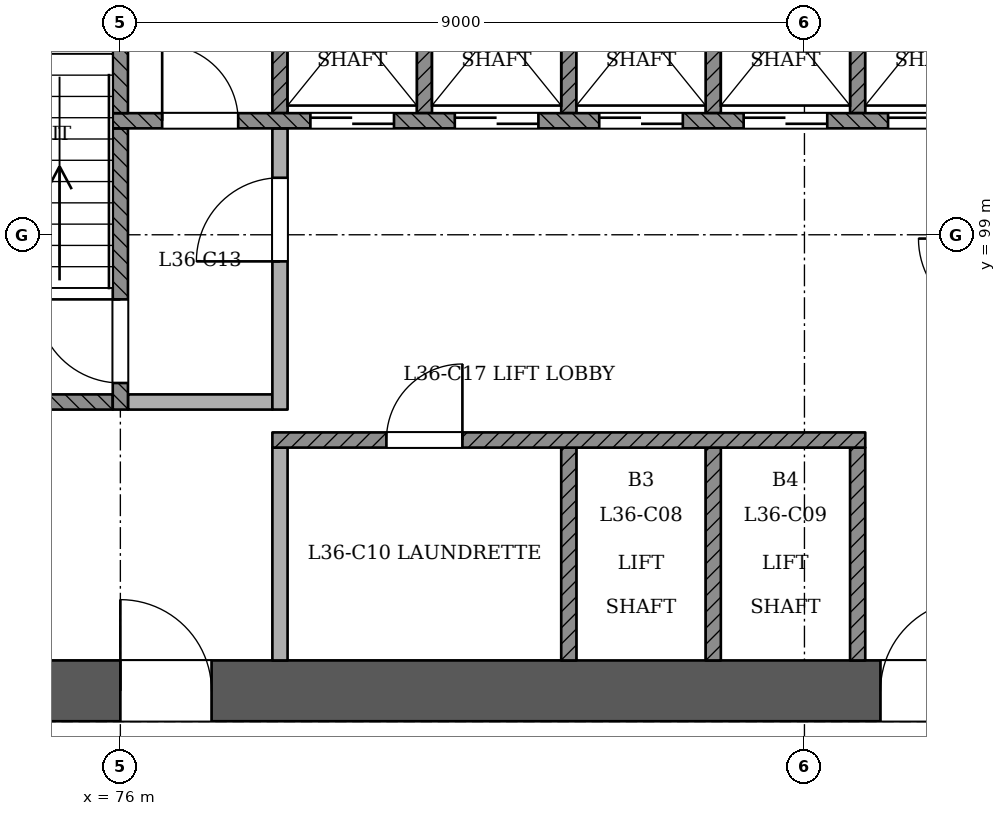
"""IFC4 building model, lengths in metres.
Left out: names, types, materials, properties, quantities, classifications, styles, units other than length and angle.
Written with IfcOpenShell. Run it as: python <this file> out.ifc"""

import sys

from ifc_helpers import new_model, si_unit, direction, frame, frame_2d, origin, place, context, subcontext, project, spatial, rectangle, extrude, element, fill, save


model = new_model("IFC4")
c1 = context("Model", 3, precision=1e-05, world=origin(), true_north=direction((0.0, 1.0)))
c2 = subcontext(c1, "Body", "Model", "MODEL_VIEW")
j1 = project(units=[si_unit("LENGTHUNIT", "METRE"), si_unit("PLANEANGLEUNIT", "RADIAN")], contexts=[c1])
p1 = place(None, origin())
s1 = spatial("IfcSite", under=j1, at=p1, CompositionType="ELEMENT")
p2 = place(p1, origin())
s2 = spatial("IfcBuilding", under=s1, at=p2, CompositionType="ELEMENT")
p3 = place(p2, frame((0.0, 0.0, 142.2)))
s3 = spatial("IfcBuildingStorey", under=s2, at=p3, CompositionType="ELEMENT", Elevation=142.2)
p4 = place(p3, frame((72.6, 93.0, 0.0), z_axis=(0.0, 0.0, 1.0), x_axis=(1.0, 0.0, 0.0)))
e1 = element("IfcWall", 1, at=p4, inside=s3, PredefinedType="SHEAR", context=c2, shape_type="SweptSolid", body=[
    extrude(rectangle(XDim=25.2, YDim=0.8, at=frame_2d((12.6, 0.0))), origin(), (0.0, 0.0, 1.0), 3.6),
])
p5 = place(p4, frame((1.2, 0.0, 0.0)))
e2 = element("IfcOpeningElement", 2, at=p5, cuts=e1, PredefinedType="OPENING", context=c2, shape_type="SweptSolid", body=[
    extrude(rectangle(XDim=1.2, YDim=2.1, at=frame_2d((0.6, 1.05))), frame((0.0, 0.411, 0.0), z_axis=(0.0, -1.0, 0.0), x_axis=(1.0, 0.0, 0.0)), (0.0, 0.0, 1.0), 0.821),
])
p6 = place(p4, frame((3.4, 0.0, 0.0)))
e3 = element("IfcOpeningElement", 3, at=p6, cuts=e1, PredefinedType="OPENING", context=c2, shape_type="SweptSolid", body=[
    extrude(rectangle(XDim=1.2, YDim=2.1, at=frame_2d((0.6, 1.05))), frame((0.0, 0.411, 0.0), z_axis=(0.0, -1.0, 0.0), x_axis=(1.0, 0.0, 0.0)), (0.0, 0.0, 1.0), 0.821),
])
p7 = place(p4, frame((13.4, 0.0, 0.0)))
e4 = element("IfcOpeningElement", 4, at=p7, cuts=e1, PredefinedType="OPENING", context=c2, shape_type="SweptSolid", body=[
    extrude(rectangle(XDim=1.2, YDim=2.1, at=frame_2d((0.6, 1.05))), frame((0.0, 0.411, 0.0), z_axis=(0.0, -1.0, 0.0), x_axis=(1.0, 0.0, 0.0)), (0.0, 0.0, 1.0), 0.821),
])
p8 = place(p4, frame((15.462, 0.0, 0.0)))
e5 = element("IfcOpeningElement", 5, at=p8, cuts=e1, PredefinedType="OPENING", context=c2, shape_type="SweptSolid", body=[
    extrude(rectangle(XDim=1.0, YDim=2.1, at=frame_2d((0.5, 1.05))), frame((0.0, 0.411, 0.0), z_axis=(0.0, -1.0, 0.0), x_axis=(1.0, 0.0, 0.0)), (0.0, 0.0, 1.0), 0.821),
])
p9 = place(p4, frame((17.7, 0.0, 0.0)))
e6 = element("IfcOpeningElement", 6, at=p9, cuts=e1, PredefinedType="OPENING", context=c2, shape_type="SweptSolid", body=[
    extrude(rectangle(XDim=1.0, YDim=2.1, at=frame_2d((0.5, 1.05))), frame((0.0, 0.411, 0.0), z_axis=(0.0, -1.0, 0.0), x_axis=(1.0, 0.0, 0.0)), (0.0, 0.0, 1.0), 0.821),
])
p10 = place(p4, frame((20.25, 0.0, 0.0)))
e7 = element("IfcOpeningElement", 7, at=p10, cuts=e1, PredefinedType="OPENING", context=c2, shape_type="SweptSolid", body=[
    extrude(rectangle(XDim=1.0, YDim=2.1, at=frame_2d((0.5, 1.05))), frame((0.0, 0.411, 0.0), z_axis=(0.0, -1.0, 0.0), x_axis=(1.0, 0.0, 0.0)), (0.0, 0.0, 1.0), 0.821),
])
p11 = place(p4, frame((22.738, 0.0, 0.0)))
e8 = element("IfcOpeningElement", 8, at=p11, cuts=e1, PredefinedType="OPENING", context=c2, shape_type="SweptSolid", body=[
    extrude(rectangle(XDim=1.0, YDim=2.1, at=frame_2d((0.5, 1.05))), frame((0.0, 0.411, 0.0), z_axis=(0.0, -1.0, 0.0), x_axis=(1.0, 0.0, 0.0)), (0.0, 0.0, 1.0), 0.821),
])
p12 = place(p3, frame((64.449, 99.517, 0.0), z_axis=(0.0, 0.0, 1.0), x_axis=(0.499425839766, -0.866356641675, 0.0)))
e9 = element("IfcWall", 9, at=p12, inside=s3, PredefinedType="PARTITIONING", context=c2, shape_type="SweptSolid", body=[
    extrude(rectangle(XDim=41.118, YDim=0.15, at=frame_2d((20.559, 0.0))), origin(), (0.0, 0.0, 1.0), 2.75),
])
p13 = place(p12, frame((0.951, 0.0, 0.0)))
e10 = element("IfcOpeningElement", 10, at=p13, cuts=e9, PredefinedType="OPENING", context=c2, shape_type="SweptSolid", body=[
    extrude(rectangle(XDim=1.2, YDim=2.1, at=frame_2d((0.6, 1.05))), frame((0.0, 0.085, 0.0), z_axis=(0.0, -1.0, 0.0), x_axis=(1.0, 0.0, 0.0)), (0.0, 0.0, 1.0), 0.171),
])
p14 = place(p12, frame((10.552, 0.0, 0.0)))
e11 = element("IfcOpeningElement", 11, at=p14, cuts=e9, PredefinedType="OPENING", context=c2, shape_type="SweptSolid", body=[
    extrude(rectangle(XDim=1.0, YDim=2.1, at=frame_2d((0.5, 1.05))), frame((0.0, 0.085, 0.0), z_axis=(0.0, -1.0, 0.0), x_axis=(1.0, 0.0, 0.0)), (0.0, 0.0, 1.0), 0.171),
])
p15 = place(p12, frame((12.762, 0.0, 0.0)))
e12 = element("IfcOpeningElement", 12, at=p15, cuts=e9, PredefinedType="OPENING", context=c2, shape_type="SweptSolid", body=[
    extrude(rectangle(XDim=1.0, YDim=2.1, at=frame_2d((0.5, 1.05))), frame((0.0, 0.085, 0.0), z_axis=(0.0, -1.0, 0.0), x_axis=(1.0, 0.0, 0.0)), (0.0, 0.0, 1.0), 0.171),
])
p16 = place(p12, frame((20.557, 0.0, 0.0)))
e13 = element("IfcOpeningElement", 13, at=p16, cuts=e9, PredefinedType="OPENING", context=c2, shape_type="SweptSolid", body=[
    extrude(rectangle(XDim=1.2, YDim=2.1, at=frame_2d((0.6, 1.05))), frame((0.0, 0.085, 0.0), z_axis=(0.0, -1.0, 0.0), x_axis=(1.0, 0.0, 0.0)), (0.0, 0.0, 1.0), 0.171),
])
p17 = place(p12, frame((28.436, 0.0, 0.0)))
e14 = element("IfcOpeningElement", 14, at=p17, cuts=e9, PredefinedType="OPENING", context=c2, shape_type="SweptSolid", body=[
    extrude(rectangle(XDim=1.0, YDim=2.1, at=frame_2d((0.5, 1.05))), frame((0.0, 0.085, 0.0), z_axis=(0.0, -1.0, 0.0), x_axis=(1.0, 0.0, 0.0)), (0.0, 0.0, 1.0), 0.171),
])
p18 = place(p12, frame((32.957, 0.0, 0.0)))
e15 = element("IfcOpeningElement", 15, at=p18, cuts=e9, PredefinedType="OPENING", context=c2, shape_type="SweptSolid", body=[
    extrude(rectangle(XDim=1.2, YDim=2.1, at=frame_2d((0.6, 1.05))), frame((0.0, 0.085, 0.0), z_axis=(0.0, -1.0, 0.0), x_axis=(1.0, 0.0, 0.0)), (0.0, 0.0, 1.0), 0.171),
])
p19 = place(p12, frame((39.53, 0.0, 0.0)))
e16 = element("IfcOpeningElement", 16, at=p19, cuts=e9, PredefinedType="OPENING", context=c2, shape_type="SweptSolid", body=[
    extrude(rectangle(XDim=1.0, YDim=2.1, at=frame_2d((0.5, 1.05))), frame((0.0, 0.085, 0.0), z_axis=(0.0, -1.0, 0.0), x_axis=(1.0, 0.0, 0.0)), (0.0, 0.0, 1.0), 0.171),
])
p20 = place(p3, frame((85.065, 63.98, 0.0), z_axis=(0.0, 0.0, 1.0), x_axis=(0.499427357949, 0.866355766491, 0.0)))
e17 = element("IfcWall", 17, at=p20, inside=s3, PredefinedType="PARTITIONING", context=c2, shape_type="SweptSolid", body=[
    extrude(rectangle(XDim=41.02, YDim=0.15, at=frame_2d((20.51, 0.0))), origin(), (0.0, 0.0, 1.0), 2.75),
])
p21 = place(p20, frame((0.382, 0.0, 0.0)))
e18 = element("IfcOpeningElement", 18, at=p21, cuts=e17, PredefinedType="OPENING", context=c2, shape_type="SweptSolid", body=[
    extrude(rectangle(XDim=1.2, YDim=2.1, at=frame_2d((0.6, 1.05))), frame((0.0, 0.085, 0.0), z_axis=(0.0, -1.0, 0.0), x_axis=(1.0, 0.0, 0.0)), (0.0, 0.0, 1.0), 0.171),
])
p22 = place(p20, frame((2.583, 0.0, 0.0)))
e19 = element("IfcOpeningElement", 19, at=p22, cuts=e17, PredefinedType="OPENING", context=c2, shape_type="SweptSolid", body=[
    extrude(rectangle(XDim=1.0, YDim=2.1, at=frame_2d((0.5, 1.05))), frame((0.0, 0.085, 0.0), z_axis=(0.0, -1.0, 0.0), x_axis=(1.0, 0.0, 0.0)), (0.0, 0.0, 1.0), 0.171),
])
p23 = place(p20, frame((8.113, 0.0, 0.0)))
e20 = element("IfcOpeningElement", 20, at=p23, cuts=e17, PredefinedType="OPENING", context=c2, shape_type="SweptSolid", body=[
    extrude(rectangle(XDim=1.0, YDim=2.1, at=frame_2d((0.5, 1.05))), frame((0.0, 0.085, 0.0), z_axis=(0.0, -1.0, 0.0), x_axis=(1.0, 0.0, 0.0)), (0.0, 0.0, 1.0), 0.171),
])
p24 = place(p20, frame((11.467, 0.0, 0.0)))
e21 = element("IfcOpeningElement", 21, at=p24, cuts=e17, PredefinedType="OPENING", context=c2, shape_type="SweptSolid", body=[
    extrude(rectangle(XDim=1.0, YDim=2.1, at=frame_2d((0.5, 1.05))), frame((0.0, 0.085, 0.0), z_axis=(0.0, -1.0, 0.0), x_axis=(1.0, 0.0, 0.0)), (0.0, 0.0, 1.0), 0.171),
])
p25 = place(p20, frame((18.142, 0.0, 0.0)))
e22 = element("IfcOpeningElement", 22, at=p25, cuts=e17, PredefinedType="OPENING", context=c2, shape_type="SweptSolid", body=[
    extrude(rectangle(XDim=1.0, YDim=2.1, at=frame_2d((0.5, 1.05))), frame((0.0, 0.085, 0.0), z_axis=(0.0, -1.0, 0.0), x_axis=(1.0, 0.0, 0.0)), (0.0, 0.0, 1.0), 0.171),
])
p26 = place(p20, frame((20.583, 0.0, 0.0)))
e23 = element("IfcOpeningElement", 23, at=p26, cuts=e17, PredefinedType="OPENING", context=c2, shape_type="SweptSolid", body=[
    extrude(rectangle(XDim=1.0, YDim=2.1, at=frame_2d((0.5, 1.05))), frame((0.0, 0.085, 0.0), z_axis=(0.0, -1.0, 0.0), x_axis=(1.0, 0.0, 0.0)), (0.0, 0.0, 1.0), 0.171),
])
p27 = place(p20, frame((26.113, 0.0, 0.0)))
e24 = element("IfcOpeningElement", 24, at=p27, cuts=e17, PredefinedType="OPENING", context=c2, shape_type="SweptSolid", body=[
    extrude(rectangle(XDim=1.0, YDim=2.1, at=frame_2d((0.5, 1.05))), frame((0.0, 0.085, 0.0), z_axis=(0.0, -1.0, 0.0), x_axis=(1.0, 0.0, 0.0)), (0.0, 0.0, 1.0), 0.171),
])
p28 = place(p20, frame((33.863, 0.0, 0.0)))
e25 = element("IfcOpeningElement", 25, at=p28, cuts=e17, PredefinedType="OPENING", context=c2, shape_type="SweptSolid", body=[
    extrude(rectangle(XDim=1.2, YDim=2.1, at=frame_2d((0.6, 1.05))), frame((0.0, 0.085, 0.0), z_axis=(0.0, -1.0, 0.0), x_axis=(1.0, 0.0, 0.0)), (0.0, 0.0, 1.0), 0.171),
])
p29 = place(p20, frame((39.545, 0.0, 0.0)))
e26 = element("IfcOpeningElement", 26, at=p29, cuts=e17, PredefinedType="OPENING", context=c2, shape_type="SweptSolid", body=[
    extrude(rectangle(XDim=1.2, YDim=2.1, at=frame_2d((0.6, 1.05))), frame((0.0, 0.085, 0.0), z_axis=(0.0, -1.0, 0.0), x_axis=(1.0, 0.0, 0.0)), (0.0, 0.0, 1.0), 0.171),
])
p30 = place(p3, frame((78.1, 93.4, 0.0), z_axis=(0.0, 0.0, 1.0), x_axis=(0.0, 1.0, 0.0)))
e27 = element("IfcWall", 27, at=p30, inside=s3, PredefinedType="PARTITIONING", context=c2, shape_type="SweptSolid", body=[
    extrude(rectangle(XDim=2.8, YDim=0.2, at=frame_2d((1.4, 0.0))), origin(), (0.0, 0.0, 1.0), 3.15),
])
for number, where, z_axis, x_axis in (
    (28, (81.9, 93.4, 0.0), (0.0, 0.0, 1.0), (0.0, 1.0, 0.0)),
    (29, (83.8, 93.4, 0.0), (0.0, 0.0, 1.0), (0.0, 1.0, 0.0)),
    (30, (85.7, 93.4, 0.0), (0.0, 0.0, 1.0), (0.0, 1.0, 0.0)),
):
    element("IfcWall", number, at=place(p3, frame(where, z_axis=z_axis, x_axis=x_axis)), inside=s3, PredefinedType="SOLIDWALL", context=c2, shape_type="SweptSolid", body=[
        extrude(rectangle(XDim=2.8, YDim=0.2, at=frame_2d((1.4, 0.0))), origin(), (0.0, 0.0, 1.0), 3.15),
    ])
p31 = place(p3, frame((78.0, 96.3, 0.0), z_axis=(0.0, 0.0, 1.0), x_axis=(1.0, 0.0, 0.0)))
e31 = element("IfcWall", 31, at=p31, inside=s3, PredefinedType="SOLIDWALL", context=c2, shape_type="SweptSolid", body=[
    extrude(rectangle(XDim=7.8, YDim=0.2, at=frame_2d((3.9, 0.0))), origin(), (0.0, 0.0, 1.0), 3.15),
])
p32 = place(p31, frame((1.5, 0.0, 0.0)))
e32 = element("IfcOpeningElement", 32, at=p32, cuts=e31, PredefinedType="OPENING", context=c2, shape_type="SweptSolid", body=[
    extrude(rectangle(XDim=1.0, YDim=2.1, at=frame_2d((0.5, 1.05))), frame((0.0, 0.11, 0.0), z_axis=(0.0, -1.0, 0.0), x_axis=(1.0, 0.0, 0.0)), (0.0, 0.0, 1.0), 0.221),
])
p33 = place(p3, frame((73.0, 96.8, 0.0), z_axis=(0.0, 0.0, 1.0), x_axis=(1.0, 0.0, 0.0)))
e33 = element("IfcWall", 33, at=p33, inside=s3, PredefinedType="SOLIDWALL", context=c2, shape_type="SweptSolid", body=[
    extrude(rectangle(XDim=2.9, YDim=0.2, at=frame_2d((1.45, 0.0))), origin(), (0.0, 0.0, 1.0), 3.15),
])
p34 = place(p3, frame((76.0, 96.7, 0.0), z_axis=(0.0, 0.0, 1.0), x_axis=(0.0, 1.0, 0.0)))
e34 = element("IfcWall", 34, at=p34, inside=s3, PredefinedType="SOLIDWALL", context=c2, shape_type="SweptSolid", body=[
    extrude(rectangle(XDim=3.7, YDim=0.2, at=frame_2d((1.85, 0.0))), origin(), (0.0, 0.0, 1.0), 3.15),
])
p35 = place(p34, frame((0.35, 0.0, 0.0)))
e35 = element("IfcOpeningElement", 35, at=p35, cuts=e34, PredefinedType="OPENING", context=c2, shape_type="SweptSolid", body=[
    extrude(rectangle(XDim=1.1, YDim=2.1, at=frame_2d((0.55, 1.05))), frame((0.0, 0.11, 0.0), z_axis=(0.0, -1.0, 0.0), x_axis=(1.0, 0.0, 0.0)), (0.0, 0.0, 1.0), 0.221),
])
p36 = place(p3, frame((76.1, 96.8, 0.0), z_axis=(0.0, 0.0, 1.0), x_axis=(1.0, 0.0, 0.0)))
e36 = element("IfcWall", 36, at=p36, inside=s3, PredefinedType="PARTITIONING", context=c2, shape_type="SweptSolid", body=[
    extrude(rectangle(XDim=1.9, YDim=0.2, at=frame_2d((0.95, 0.0))), origin(), (0.0, 0.0, 1.0), 3.15),
])
p37 = place(p3, frame((78.1, 96.7, 0.0), z_axis=(0.0, 0.0, 1.0), x_axis=(0.0, 1.0, 0.0)))
e37 = element("IfcWall", 37, at=p37, inside=s3, PredefinedType="PARTITIONING", context=c2, shape_type="SweptSolid", body=[
    extrude(rectangle(XDim=3.7, YDim=0.2, at=frame_2d((1.85, 0.0))), origin(), (0.0, 0.0, 1.0), 3.15),
])
p38 = place(p37, frame((1.95, 0.0, 0.0)))
e38 = element("IfcOpeningElement", 38, at=p38, cuts=e37, PredefinedType="OPENING", context=c2, shape_type="SweptSolid", body=[
    extrude(rectangle(XDim=1.1, YDim=2.1, at=frame_2d((0.55, 1.05))), frame((0.0, 0.11, 0.0), z_axis=(0.0, -1.0, 0.0), x_axis=(1.0, 0.0, 0.0)), (0.0, 0.0, 1.0), 0.221),
])
p39 = place(p3, frame((75.9, 100.5, 0.0), z_axis=(0.0, 0.0, 1.0), x_axis=(1.0, 0.0, 0.0)))
e39 = element("IfcWall", 39, at=p39, inside=s3, PredefinedType="SOLIDWALL", context=c2, shape_type="SweptSolid", body=[
    extrude(rectangle(XDim=18.2, YDim=0.2, at=frame_2d((9.1, 0.0))), origin(), (0.0, 0.0, 1.0), 3.15),
])
p40 = place(p39, frame((2.6, 0.0, 0.0)))
e40 = element("IfcOpeningElement", 40, at=p40, cuts=e39, PredefinedType="OPENING", context=c2, shape_type="SweptSolid", body=[
    extrude(rectangle(XDim=1.1, YDim=2.1, at=frame_2d((0.55, 1.05))), frame((0.0, 0.11, 0.0), z_axis=(0.0, -1.0, 0.0), x_axis=(1.0, 0.0, 0.0)), (0.0, 0.0, 1.0), 0.221),
])
p41 = place(p39, frame((4.5, 0.0, 0.0)))
e41 = element("IfcOpeningElement", 41, at=p41, cuts=e39, PredefinedType="OPENING", context=c2, shape_type="SweptSolid", body=[
    extrude(rectangle(XDim=1.1, YDim=2.1, at=frame_2d((0.55, 1.05))), frame((0.0, 0.11, 0.0), z_axis=(0.0, -1.0, 0.0), x_axis=(1.0, 0.0, 0.0)), (0.0, 0.0, 1.0), 0.221),
])
p42 = place(p39, frame((6.4, 0.0, 0.0)))
e42 = element("IfcOpeningElement", 42, at=p42, cuts=e39, PredefinedType="OPENING", context=c2, shape_type="SweptSolid", body=[
    extrude(rectangle(XDim=1.1, YDim=2.1, at=frame_2d((0.55, 1.05))), frame((0.0, 0.11, 0.0), z_axis=(0.0, -1.0, 0.0), x_axis=(1.0, 0.0, 0.0)), (0.0, 0.0, 1.0), 0.221),
])
p43 = place(p39, frame((8.3, 0.0, 0.0)))
e43 = element("IfcOpeningElement", 43, at=p43, cuts=e39, PredefinedType="OPENING", context=c2, shape_type="SweptSolid", body=[
    extrude(rectangle(XDim=1.1, YDim=2.1, at=frame_2d((0.55, 1.05))), frame((0.0, 0.11, 0.0), z_axis=(0.0, -1.0, 0.0), x_axis=(1.0, 0.0, 0.0)), (0.0, 0.0, 1.0), 0.221),
])
p44 = place(p39, frame((10.2, 0.0, 0.0)))
e44 = element("IfcOpeningElement", 44, at=p44, cuts=e39, PredefinedType="OPENING", context=c2, shape_type="SweptSolid", body=[
    extrude(rectangle(XDim=1.1, YDim=2.1, at=frame_2d((0.55, 1.05))), frame((0.0, 0.11, 0.0), z_axis=(0.0, -1.0, 0.0), x_axis=(1.0, 0.0, 0.0)), (0.0, 0.0, 1.0), 0.221),
])
p45 = place(p39, frame((12.1, 0.0, 0.0)))
e45 = element("IfcOpeningElement", 45, at=p45, cuts=e39, PredefinedType="OPENING", context=c2, shape_type="SweptSolid", body=[
    extrude(rectangle(XDim=1.1, YDim=2.1, at=frame_2d((0.55, 1.05))), frame((0.0, 0.11, 0.0), z_axis=(0.0, -1.0, 0.0), x_axis=(1.0, 0.0, 0.0)), (0.0, 0.0, 1.0), 0.221),
])
p46 = place(p39, frame((14.0, 0.0, 0.0)))
e46 = element("IfcOpeningElement", 46, at=p46, cuts=e39, PredefinedType="OPENING", context=c2, shape_type="SweptSolid", body=[
    extrude(rectangle(XDim=1.1, YDim=2.1, at=frame_2d((0.55, 1.05))), frame((0.0, 0.11, 0.0), z_axis=(0.0, -1.0, 0.0), x_axis=(1.0, 0.0, 0.0)), (0.0, 0.0, 1.0), 0.221),
])
p47 = place(p39, frame((0.65, 0.0, 0.0)))
e47 = element("IfcOpeningElement", 47, at=p47, cuts=e39, PredefinedType="OPENING", context=c2, shape_type="SweptSolid", body=[
    extrude(rectangle(XDim=1.0, YDim=2.1, at=frame_2d((0.5, 1.05))), frame((0.0, 0.11, 0.0), z_axis=(0.0, -1.0, 0.0), x_axis=(1.0, 0.0, 0.0)), (0.0, 0.0, 1.0), 0.221),
])
p48 = place(p39, frame((16.3, 0.0, 0.0)))
e48 = element("IfcOpeningElement", 48, at=p48, cuts=e39, PredefinedType="OPENING", context=c2, shape_type="SweptSolid", body=[
    extrude(rectangle(XDim=1.0, YDim=2.1, at=frame_2d((0.5, 1.05))), frame((0.0, 0.11, 0.0), z_axis=(0.0, -1.0, 0.0), x_axis=(1.0, 0.0, 0.0)), (0.0, 0.0, 1.0), 0.221),
])
for number, where, z_axis, x_axis in (
    (49, (76.0, 100.6, 0.0), (0.0, 0.0, 1.0), (0.0, 1.0, 0.0)),
    (50, (78.1, 100.6, 0.0), (0.0, 0.0, 1.0), (0.0, 1.0, 0.0)),
    (51, (80.0, 100.6, 0.0), (0.0, 0.0, 1.0), (0.0, 1.0, 0.0)),
    (52, (81.9, 100.6, 0.0), (0.0, 0.0, 1.0), (0.0, 1.0, 0.0)),
    (53, (83.8, 100.6, 0.0), (0.0, 0.0, 1.0), (0.0, 1.0, 0.0)),
    (54, (85.7, 100.6, 0.0), (0.0, 0.0, 1.0), (0.0, 1.0, 0.0)),
):
    element("IfcWall", number, at=place(p3, frame(where, z_axis=z_axis, x_axis=x_axis)), inside=s3, PredefinedType="SOLIDWALL", context=c2, shape_type="SweptSolid", body=[
        extrude(rectangle(XDim=2.8, YDim=0.2, at=frame_2d((1.4, 0.0))), origin(), (0.0, 0.0, 1.0), 3.15),
    ])
p49 = place(p40, origin())
e55 = element("IfcDoor", 55, at=p49, inside=s3, OperationType="SLIDING_TO_RIGHT", PredefinedType="NOTDEFINED", context=c2, shape_type="SweptSolid", body=[
    extrude(rectangle(XDim=1.1, YDim=2.1, at=frame_2d((0.55, 1.05))), frame((0.0, 0.025, 0.0), z_axis=(0.0, -1.0, 0.0), x_axis=(1.0, 0.0, 0.0)), (0.0, 0.0, 1.0), 0.05),
])
fill(e40, e55)
p50 = place(p41, origin())
e56 = element("IfcDoor", 56, at=p50, inside=s3, OperationType="SLIDING_TO_LEFT", PredefinedType="NOTDEFINED", context=c2, shape_type="SweptSolid", body=[
    extrude(rectangle(XDim=1.1, YDim=2.1, at=frame_2d((0.55, 1.05))), frame((0.0, 0.025, 0.0), z_axis=(0.0, -1.0, 0.0), x_axis=(1.0, 0.0, 0.0)), (0.0, 0.0, 1.0), 0.05),
])
fill(e41, e56)
p51 = place(p42, origin())
e57 = element("IfcDoor", 57, at=p51, inside=s3, OperationType="SLIDING_TO_RIGHT", PredefinedType="NOTDEFINED", context=c2, shape_type="SweptSolid", body=[
    extrude(rectangle(XDim=1.1, YDim=2.1, at=frame_2d((0.55, 1.05))), frame((0.0, 0.025, 0.0), z_axis=(0.0, -1.0, 0.0), x_axis=(1.0, 0.0, 0.0)), (0.0, 0.0, 1.0), 0.05),
])
fill(e42, e57)
p52 = place(p43, origin())
e58 = element("IfcDoor", 58, at=p52, inside=s3, OperationType="SLIDING_TO_LEFT", PredefinedType="NOTDEFINED", context=c2, shape_type="SweptSolid", body=[
    extrude(rectangle(XDim=1.1, YDim=2.1, at=frame_2d((0.55, 1.05))), frame((0.0, 0.025, 0.0), z_axis=(0.0, -1.0, 0.0), x_axis=(1.0, 0.0, 0.0)), (0.0, 0.0, 1.0), 0.05),
])
fill(e43, e58)
p53 = place(p44, origin())
e59 = element("IfcDoor", 59, at=p53, inside=s3, OperationType="SLIDING_TO_RIGHT", PredefinedType="NOTDEFINED", context=c2, shape_type="SweptSolid", body=[
    extrude(rectangle(XDim=1.1, YDim=2.1, at=frame_2d((0.55, 1.05))), frame((0.0, 0.025, 0.0), z_axis=(0.0, -1.0, 0.0), x_axis=(1.0, 0.0, 0.0)), (0.0, 0.0, 1.0), 0.05),
])
fill(e44, e59)
p54 = place(p35, origin())
e60 = element("IfcDoor", 60, at=p54, inside=s3, OperationType="SINGLE_SWING_RIGHT", PredefinedType="NOTDEFINED", context=c2, shape_type="SweptSolid", body=[
    extrude(rectangle(XDim=1.1, YDim=2.1, at=frame_2d((0.55, 1.05))), frame((0.0, 0.025, 0.0), z_axis=(0.0, -1.0, 0.0), x_axis=(1.0, 0.0, 0.0)), (0.0, 0.0, 1.0), 0.05),
])
fill(e35, e60)
p55 = place(p38, origin())
e61 = element("IfcDoor", 61, at=p55, inside=s3, OperationType="SINGLE_SWING_LEFT", PredefinedType="NOTDEFINED", context=c2, shape_type="SweptSolid", body=[
    extrude(rectangle(XDim=1.1, YDim=2.1, at=frame_2d((0.55, 1.05))), frame((0.0, 0.025, 0.0), z_axis=(0.0, -1.0, 0.0), x_axis=(1.0, 0.0, 0.0)), (0.0, 0.0, 1.0), 0.05),
])
fill(e38, e61)
p56 = place(p6, origin())
e62 = element("IfcDoor", 62, at=p56, inside=s3, OperationType="SINGLE_SWING_LEFT", PredefinedType="NOTDEFINED", context=c2, shape_type="SweptSolid", body=[
    extrude(rectangle(XDim=1.2, YDim=2.1, at=frame_2d((0.6, 1.05))), frame((0.0, 0.025, 0.0), z_axis=(0.0, -1.0, 0.0), x_axis=(1.0, 0.0, 0.0)), (0.0, 0.0, 1.0), 0.05),
])
fill(e3, e62)
p57 = place(p7, origin())
e63 = element("IfcDoor", 63, at=p57, inside=s3, OperationType="SINGLE_SWING_RIGHT", PredefinedType="NOTDEFINED", context=c2, shape_type="SweptSolid", body=[
    extrude(rectangle(XDim=1.2, YDim=2.1, at=frame_2d((0.6, 1.05))), frame((0.0, 0.025, 0.0), z_axis=(0.0, -1.0, 0.0), x_axis=(1.0, 0.0, 0.0)), (0.0, 0.0, 1.0), 0.05),
])
fill(e4, e63)
p58 = place(p47, origin())
e64 = element("IfcDoor", 64, at=p58, inside=s3, OperationType="SINGLE_SWING_LEFT", PredefinedType="NOTDEFINED", context=c2, shape_type="SweptSolid", body=[
    extrude(rectangle(XDim=1.0, YDim=2.1, at=frame_2d((0.5, 1.05))), frame((0.0, 0.025, 0.0), z_axis=(0.0, -1.0, 0.0), x_axis=(1.0, 0.0, 0.0)), (0.0, 0.0, 1.0), 0.05),
])
fill(e47, e64)
p59 = place(p32, origin())
e65 = element("IfcDoor", 65, at=p59, inside=s3, OperationType="SINGLE_SWING_RIGHT", PredefinedType="NOTDEFINED", context=c2, shape_type="SweptSolid", body=[
    extrude(rectangle(XDim=1.0, YDim=2.1, at=frame_2d((0.5, 1.05))), frame((0.0, 0.025, 0.0), z_axis=(0.0, -1.0, 0.0), x_axis=(1.0, 0.0, 0.0)), (0.0, 0.0, 1.0), 0.05),
])
fill(e32, e65)
save(model, sys.argv[1])
